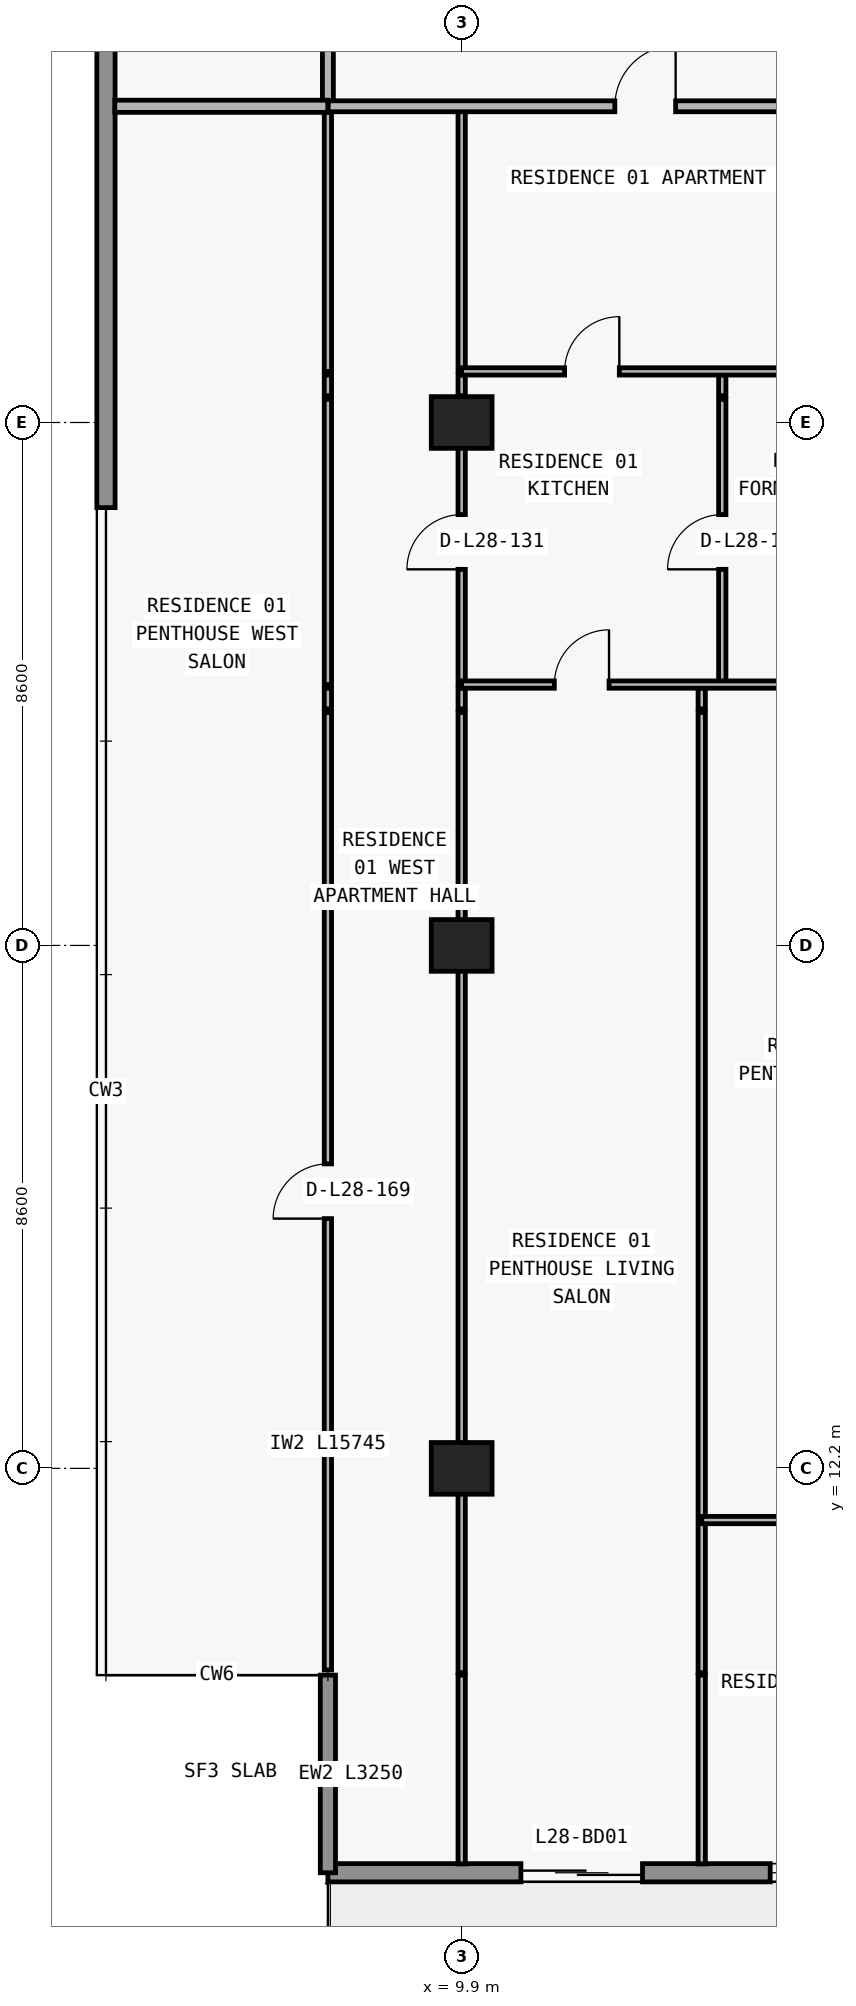
"""IFC4 building model, lengths in metres.
Left out: names, types, materials, properties, quantities, classifications, styles, units other than length and angle.
Written with IfcOpenShell. Run it as: python <this file> out.ifc"""

import sys

from ifc_helpers import new_model, si_unit, direction, frame, frame_2d, origin, origin_2d, place, context, subcontext, project, spatial, rectangle, extrude, element, fill, save


model = new_model("IFC4")
c1 = context("Model", 3, precision=1e-05, world=origin(), true_north=direction((0.0, 1.0)))
c2 = subcontext(c1, "Body", "Model", "MODEL_VIEW")
j1 = project(units=[si_unit("LENGTHUNIT", "METRE"), si_unit("PLANEANGLEUNIT", "RADIAN")], contexts=[c1])
p1 = place(None, origin())
s1 = spatial("IfcSite", under=j1, at=p1, CompositionType="ELEMENT")
p2 = place(p1, origin())
s2 = spatial("IfcBuilding", under=s1, at=p2, CompositionType="ELEMENT")
p3 = place(p2, frame((0.0, 0.0, 105.9)))
s3 = spatial("IfcBuildingStorey", under=s2, at=p3, CompositionType="ELEMENT", Elevation=105.9)
for number, where, z_axis, x_axis in (
    (1, (9.9, 12.2, 0.0), (0.0, 0.0, 1.0), (1.0, 0.0, 0.0)),
    (2, (9.9, 20.8, 0.0), (0.0, 0.0, 1.0), (1.0, 0.0, 0.0)),
    (3, (9.9, 29.4, 0.0), (0.0, 0.0, 1.0), (1.0, 0.0, 0.0)),
):
    element("IfcColumn", number, at=place(p3, frame(where, z_axis=z_axis, x_axis=x_axis)), inside=s3, PredefinedType="COLUMN", context=c2, shape_type="SweptSolid", body=[
        extrude(rectangle(XDim=1.0, YDim=0.85, at=origin_2d()), origin(), (0.0, 0.0, 1.0), 3.05),
    ])
p4 = place(p3, frame((70.1, 5.55, 0.0), z_axis=(0.0, 0.0, 1.0), x_axis=(-1.0, 0.0, 0.0)))
e4 = element("IfcWall", 4, at=p4, inside=s3, PredefinedType="STANDARD", context=c2, shape_type="SweptSolid", body=[
    extrude(rectangle(XDim=62.4, YDim=0.3, at=frame_2d((31.2, 0.0))), origin(), (0.0, 0.0, 1.0), 3.05),
])
p5 = place(p4, frame((57.226, 0.0, 0.0)))
e5 = element("IfcOpeningElement", 5, at=p5, cuts=e4, PredefinedType="OPENING", context=c2, shape_type="SweptSolid", body=[
    extrude(rectangle(XDim=2.0, YDim=2.3, at=frame_2d((1.0, 1.15))), frame((0.0, 0.16, 0.0), z_axis=(0.0, -1.0, 0.0), x_axis=(1.0, 0.0, 0.0)), (0.0, 0.0, 1.0), 0.32),
])
p6 = place(p4, frame((52.926, 0.0, 0.85)))
e6 = element("IfcOpeningElement", 6, at=p6, cuts=e4, PredefinedType="OPENING", context=c2, shape_type="SweptSolid", body=[
    extrude(rectangle(XDim=2.2, YDim=1.55, at=frame_2d((1.1, 0.775))), frame((0.0, 0.16, 0.0), z_axis=(0.0, -1.0, 0.0), x_axis=(1.0, 0.0, 0.0)), (0.0, 0.0, 1.0), 0.32),
])
p7 = place(p4, frame((48.49, 0.0, 0.0)))
e7 = element("IfcOpeningElement", 7, at=p7, cuts=e4, PredefinedType="OPENING", context=c2, shape_type="SweptSolid", body=[
    extrude(rectangle(XDim=2.0, YDim=2.3, at=frame_2d((1.0, 1.15))), frame((0.0, 0.16, 0.0), z_axis=(0.0, -1.0, 0.0), x_axis=(1.0, 0.0, 0.0)), (0.0, 0.0, 1.0), 0.32),
])
p8 = place(p4, frame((44.39, 0.0, 0.85)))
e8 = element("IfcOpeningElement", 8, at=p8, cuts=e4, PredefinedType="OPENING", context=c2, shape_type="SweptSolid", body=[
    extrude(rectangle(XDim=1.8, YDim=1.55, at=frame_2d((0.9, 0.775))), frame((0.0, 0.16, 0.0), z_axis=(0.0, -1.0, 0.0), x_axis=(1.0, 0.0, 0.0)), (0.0, 0.0, 1.0), 0.32),
])
p9 = place(p4, frame((40.49, 0.0, 0.0)))
e9 = element("IfcOpeningElement", 9, at=p9, cuts=e4, PredefinedType="OPENING", context=c2, shape_type="SweptSolid", body=[
    extrude(rectangle(XDim=2.0, YDim=2.3, at=frame_2d((1.0, 1.15))), frame((0.0, 0.16, 0.0), z_axis=(0.0, -1.0, 0.0), x_axis=(1.0, 0.0, 0.0)), (0.0, 0.0, 1.0), 0.32),
])
p10 = place(p4, frame((35.81, 0.0, 0.65)))
e10 = element("IfcOpeningElement", 10, at=p10, cuts=e4, PredefinedType="OPENING", context=c2, shape_type="SweptSolid", body=[
    extrude(rectangle(XDim=2.6, YDim=1.85, at=frame_2d((1.3, 0.925))), frame((0.0, 0.16, 0.0), z_axis=(0.0, -1.0, 0.0), x_axis=(1.0, 0.0, 0.0)), (0.0, 0.0, 1.0), 0.32),
])
p11 = place(p4, frame((30.1, 0.0, 0.85)))
e11 = element("IfcOpeningElement", 11, at=p11, cuts=e4, PredefinedType="OPENING", context=c2, shape_type="SweptSolid", body=[
    extrude(rectangle(XDim=2.2, YDim=1.55, at=frame_2d((1.1, 0.775))), frame((0.0, 0.16, 0.0), z_axis=(0.0, -1.0, 0.0), x_axis=(1.0, 0.0, 0.0)), (0.0, 0.0, 1.0), 0.32),
])
p12 = place(p4, frame((22.1, 0.0, 0.85)))
e12 = element("IfcOpeningElement", 12, at=p12, cuts=e4, PredefinedType="OPENING", context=c2, shape_type="SweptSolid", body=[
    extrude(rectangle(XDim=2.2, YDim=1.55, at=frame_2d((1.1, 0.775))), frame((0.0, 0.16, 0.0), z_axis=(0.0, -1.0, 0.0), x_axis=(1.0, 0.0, 0.0)), (0.0, 0.0, 1.0), 0.32),
])
p13 = place(p4, frame((15.69, 0.0, 0.0)))
e13 = element("IfcOpeningElement", 13, at=p13, cuts=e4, PredefinedType="OPENING", context=c2, shape_type="SweptSolid", body=[
    extrude(rectangle(XDim=2.0, YDim=2.3, at=frame_2d((1.0, 1.15))), frame((0.0, 0.16, 0.0), z_axis=(0.0, -1.0, 0.0), x_axis=(1.0, 0.0, 0.0)), (0.0, 0.0, 1.0), 0.32),
])
p14 = place(p4, frame((11.59, 0.0, 0.85)))
e14 = element("IfcOpeningElement", 14, at=p14, cuts=e4, PredefinedType="OPENING", context=c2, shape_type="SweptSolid", body=[
    extrude(rectangle(XDim=1.8, YDim=1.55, at=frame_2d((0.9, 0.775))), frame((0.0, 0.16, 0.0), z_axis=(0.0, -1.0, 0.0), x_axis=(1.0, 0.0, 0.0)), (0.0, 0.0, 1.0), 0.32),
])
p15 = place(p4, frame((7.626, 0.0, 0.0)))
e15 = element("IfcOpeningElement", 15, at=p15, cuts=e4, PredefinedType="OPENING", context=c2, shape_type="SweptSolid", body=[
    extrude(rectangle(XDim=2.0, YDim=2.3, at=frame_2d((1.0, 1.15))), frame((0.0, 0.16, 0.0), z_axis=(0.0, -1.0, 0.0), x_axis=(1.0, 0.0, 0.0)), (0.0, 0.0, 1.0), 0.32),
])
p16 = place(p4, frame((3.326, 0.0, 0.85)))
e16 = element("IfcOpeningElement", 16, at=p16, cuts=e4, PredefinedType="OPENING", context=c2, shape_type="SweptSolid", body=[
    extrude(rectangle(XDim=2.2, YDim=1.55, at=frame_2d((1.1, 0.775))), frame((0.0, 0.16, 0.0), z_axis=(0.0, -1.0, 0.0), x_axis=(1.0, 0.0, 0.0)), (0.0, 0.0, 1.0), 0.32),
])
p17 = place(p3, frame((7.7, 8.8, 0.0), z_axis=(0.0, 0.0, 1.0), x_axis=(0.0, -1.0, 0.0)))
e17 = element("IfcWall", 17, at=p17, inside=s3, PredefinedType="ELEMENTEDWALL", context=c2, shape_type="SweptSolid", body=[
    extrude(rectangle(XDim=3.25, YDim=0.25, at=frame_2d((1.625, 0.0))), origin(), (0.0, 0.0, 1.0), 3.05),
])
p18 = place(p3, frame((4.05, 28.0, 0.0), z_axis=(0.0, 0.0, 1.0), x_axis=(0.0, 1.0, 0.0)))
e18 = element("IfcWall", 18, at=p18, inside=s3, PredefinedType="STANDARD", context=c2, shape_type="SweptSolid", body=[
    extrude(rectangle(XDim=19.2, YDim=0.3, at=frame_2d((9.6, 0.0))), origin(), (0.0, 0.0, 1.0), 3.05),
])
p19 = place(p3, frame((7.7, 8.885, 0.0), z_axis=(0.0, 0.0, 1.0), x_axis=(0.0, 1.0, 0.0)))
e19 = element("IfcWall", 19, at=p19, inside=s3, PredefinedType="PARTITIONING", context=c2, shape_type="SweptSolid", body=[
    extrude(rectangle(XDim=15.745, YDim=0.12, at=frame_2d((7.873, 0.0))), origin(), (0.0, 0.0, 1.0), 3.05),
])
p20 = place(p19, frame((7.423, 0.0, 0.0)))
e20 = element("IfcOpeningElement", 20, at=p20, cuts=e19, PredefinedType="OPENING", context=c2, shape_type="SweptSolid", body=[
    extrude(rectangle(XDim=0.9, YDim=2.15, at=frame_2d((0.45, 1.075))), frame((0.0, 0.07, 0.0), z_axis=(0.0, -1.0, 0.0), x_axis=(1.0, 0.0, 0.0)), (0.0, 0.0, 1.0), 0.14),
])
p21 = place(p3, frame((7.7, 24.69, 0.0), z_axis=(0.0, 0.0, 1.0), x_axis=(0.0, 1.0, 0.0)))
e21 = element("IfcWall", 21, at=p21, inside=s3, PredefinedType="PARTITIONING", context=c2, shape_type="SweptSolid", body=[
    extrude(rectangle(XDim=0.34, YDim=0.12, at=frame_2d((0.17, 0.0))), origin(), (0.0, 0.0, 1.0), 3.05),
])
p22 = place(p3, frame((7.7, 25.09, 0.0), z_axis=(0.0, 0.0, 1.0), x_axis=(0.0, 1.0, 0.0)))
e22 = element("IfcWall", 22, at=p22, inside=s3, PredefinedType="PARTITIONING", context=c2, shape_type="SweptSolid", body=[
    extrude(rectangle(XDim=4.69, YDim=0.12, at=frame_2d((2.345, 0.0))), origin(), (0.0, 0.0, 1.0), 3.05),
])
p23 = place(p3, frame((7.7, 29.84, 0.0), z_axis=(0.0, 0.0, 1.0), x_axis=(0.0, 1.0, 0.0)))
e23 = element("IfcWall", 23, at=p23, inside=s3, PredefinedType="PARTITIONING", context=c2, shape_type="SweptSolid", body=[
    extrude(rectangle(XDim=0.34, YDim=0.12, at=frame_2d((0.17, 0.0))), origin(), (0.0, 0.0, 1.0), 3.05),
])
p24 = place(p3, frame((7.7, 30.24, 0.0), z_axis=(0.0, 0.0, 1.0), x_axis=(0.0, 1.0, 0.0)))
e24 = element("IfcWall", 24, at=p24, inside=s3, PredefinedType="PARTITIONING", context=c2, shape_type="SweptSolid", body=[
    extrude(rectangle(XDim=4.36, YDim=0.12, at=frame_2d((2.18, 0.0))), origin(), (0.0, 0.0, 1.0), 3.05),
])
p25 = place(p3, frame((7.7, 34.605, 0.0), z_axis=(0.0, 0.0, 1.0), x_axis=(0.0, 1.0, 0.0)))
e25 = element("IfcWall", 25, at=p25, inside=s3, PredefinedType="PARTITIONING", context=c2, shape_type="SweptSolid", body=[
    extrude(rectangle(XDim=2.345, YDim=0.18, at=frame_2d((1.172, 0.0))), origin(), (0.0, 0.0, 1.0), 3.05),
])
p26 = place(p3, frame((9.9, 5.695, 0.0), z_axis=(0.0, 0.0, 1.0), x_axis=(0.0, 1.0, 0.0)))
e26 = element("IfcWall", 26, at=p26, inside=s3, PredefinedType="PARTITIONING", context=c2, shape_type="SweptSolid", body=[
    extrude(rectangle(XDim=3.105, YDim=0.12, at=frame_2d((1.552, 0.0))), origin(), (0.0, 0.0, 1.0), 3.05),
])
p27 = place(p3, frame((9.9, 8.84, 0.0), z_axis=(0.0, 0.0, 1.0), x_axis=(0.0, 1.0, 0.0)))
e27 = element("IfcWall", 27, at=p27, inside=s3, PredefinedType="PARTITIONING", context=c2, shape_type="SweptSolid", body=[
    extrude(rectangle(XDim=15.79, YDim=0.12, at=frame_2d((7.895, 0.0))), origin(), (0.0, 0.0, 1.0), 2.174),
])
p28 = place(p3, frame((9.9, 24.69, 0.0), z_axis=(0.0, 0.0, 1.0), x_axis=(0.0, 1.0, 0.0)))
e28 = element("IfcWall", 28, at=p28, inside=s3, PredefinedType="PARTITIONING", context=c2, shape_type="SweptSolid", body=[
    extrude(rectangle(XDim=0.34, YDim=0.12, at=frame_2d((0.17, 0.0))), origin(), (0.0, 0.0, 1.0), 2.174),
])
p29 = place(p3, frame((9.9, 25.09, 0.0), z_axis=(0.0, 0.0, 1.0), x_axis=(0.0, 1.0, 0.0)))
e29 = element("IfcWall", 29, at=p29, inside=s3, PredefinedType="PARTITIONING", context=c2, shape_type="SweptSolid", body=[
    extrude(rectangle(XDim=4.69, YDim=0.12, at=frame_2d((2.345, 0.0))), origin(), (0.0, 0.0, 1.0), 2.174),
])
p30 = place(p29, frame((1.895, 0.0, 0.0)))
e30 = element("IfcOpeningElement", 30, at=p30, cuts=e29, PredefinedType="OPENING", context=c2, shape_type="SweptSolid", body=[
    extrude(rectangle(XDim=0.9, YDim=2.124, at=frame_2d((0.45, 1.062))), frame((0.0, 0.07, 0.0), z_axis=(0.0, -1.0, 0.0), x_axis=(1.0, 0.0, 0.0)), (0.0, 0.0, 1.0), 0.14),
])
p31 = place(p3, frame((9.9, 29.84, 0.0), z_axis=(0.0, 0.0, 1.0), x_axis=(0.0, 1.0, 0.0)))
e31 = element("IfcWall", 31, at=p31, inside=s3, PredefinedType="PARTITIONING", context=c2, shape_type="SweptSolid", body=[
    extrude(rectangle(XDim=0.34, YDim=0.12, at=frame_2d((0.17, 0.0))), origin(), (0.0, 0.0, 1.0), 2.174),
])
p32 = place(p3, frame((9.9, 30.24, 0.0), z_axis=(0.0, 0.0, 1.0), x_axis=(0.0, 1.0, 0.0)))
e32 = element("IfcWall", 32, at=p32, inside=s3, PredefinedType="PARTITIONING", context=c2, shape_type="SweptSolid", body=[
    extrude(rectangle(XDim=4.36, YDim=0.12, at=frame_2d((2.18, 0.0))), origin(), (0.0, 0.0, 1.0), 2.174),
])
p33 = place(p3, frame((13.848, 5.695, 0.0), z_axis=(0.0, 0.0, 1.0), x_axis=(0.0, 1.0, 0.0)))
e33 = element("IfcWall", 33, at=p33, inside=s3, PredefinedType="PARTITIONING", context=c2, shape_type="SweptSolid", body=[
    extrude(rectangle(XDim=3.105, YDim=0.12, at=frame_2d((1.552, 0.0))), origin(), (0.0, 0.0, 1.0), 3.05),
])
p34 = place(p3, frame((13.848, 8.84, 0.0), z_axis=(0.0, 0.0, 1.0), x_axis=(0.0, 1.0, 0.0)))
e34 = element("IfcWall", 34, at=p34, inside=s3, PredefinedType="PARTITIONING", context=c2, shape_type="SweptSolid", body=[
    extrude(rectangle(XDim=15.79, YDim=0.12, at=frame_2d((7.895, 0.0))), origin(), (0.0, 0.0, 1.0), 3.05),
])
p35 = place(p3, frame((13.848, 24.69, 0.0), z_axis=(0.0, 0.0, 1.0), x_axis=(0.0, 1.0, 0.0)))
e35 = element("IfcWall", 35, at=p35, inside=s3, PredefinedType="PARTITIONING", context=c2, shape_type="SweptSolid", body=[
    extrude(rectangle(XDim=0.34, YDim=0.12, at=frame_2d((0.17, 0.0))), origin(), (0.0, 0.0, 1.0), 3.05),
])
p36 = place(p3, frame((14.186, 25.09, 0.0), z_axis=(0.0, 0.0, 1.0), x_axis=(0.0, 1.0, 0.0)))
e36 = element("IfcWall", 36, at=p36, inside=s3, PredefinedType="PARTITIONING", context=c2, shape_type="SweptSolid", body=[
    extrude(rectangle(XDim=4.69, YDim=0.12, at=frame_2d((2.345, 0.0))), origin(), (0.0, 0.0, 1.0), 3.05),
])
p37 = place(p36, frame((1.895, 0.0, 0.0)))
e37 = element("IfcOpeningElement", 37, at=p37, cuts=e36, PredefinedType="OPENING", context=c2, shape_type="SweptSolid", body=[
    extrude(rectangle(XDim=0.9, YDim=2.15, at=frame_2d((0.45, 1.075))), frame((0.0, 0.07, 0.0), z_axis=(0.0, -1.0, 0.0), x_axis=(1.0, 0.0, 0.0)), (0.0, 0.0, 1.0), 0.14),
])
p38 = place(p3, frame((14.186, 29.84, 0.0), z_axis=(0.0, 0.0, 1.0), x_axis=(0.0, 1.0, 0.0)))
e38 = element("IfcWall", 38, at=p38, inside=s3, PredefinedType="PARTITIONING", context=c2, shape_type="SweptSolid", body=[
    extrude(rectangle(XDim=0.34, YDim=0.12, at=frame_2d((0.17, 0.0))), origin(), (0.0, 0.0, 1.0), 3.05),
])
p39 = place(p3, frame((13.848, 11.35, 0.0), z_axis=(0.0, 0.0, 1.0), x_axis=(1.0, 0.0, 0.0)))
e39 = element("IfcWall", 39, at=p39, inside=s3, PredefinedType="PARTITIONING", context=c2, shape_type="SweptSolid", body=[
    extrude(rectangle(XDim=4.402, YDim=0.12, at=frame_2d((2.201, 0.0))), origin(), (0.0, 0.0, 1.0), 3.05),
])
p40 = place(p39, frame((1.751, 0.0, 0.0)))
e40 = element("IfcOpeningElement", 40, at=p40, cuts=e39, PredefinedType="OPENING", context=c2, shape_type="SweptSolid", body=[
    extrude(rectangle(XDim=0.9, YDim=2.15, at=frame_2d((0.45, 1.075))), frame((0.0, 0.07, 0.0), z_axis=(0.0, -1.0, 0.0), x_axis=(1.0, 0.0, 0.0)), (0.0, 0.0, 1.0), 0.14),
])
p41 = place(p3, frame((9.9, 25.09, 0.0), z_axis=(0.0, 0.0, 1.0), x_axis=(1.0, 0.0, 0.0)))
e41 = element("IfcWall", 41, at=p41, inside=s3, PredefinedType="PARTITIONING", context=c2, shape_type="SweptSolid", body=[
    extrude(rectangle(XDim=8.35, YDim=0.12, at=frame_2d((4.175, 0.0))), origin(), (0.0, 0.0, 1.0), 3.05),
])
p42 = place(p41, frame((1.524, 0.0, 0.0)))
e42 = element("IfcOpeningElement", 42, at=p42, cuts=e41, PredefinedType="OPENING", context=c2, shape_type="SweptSolid", body=[
    extrude(rectangle(XDim=0.9, YDim=2.15, at=frame_2d((0.45, 1.075))), frame((0.0, 0.07, 0.0), z_axis=(0.0, -1.0, 0.0), x_axis=(1.0, 0.0, 0.0)), (0.0, 0.0, 1.0), 0.14),
])
p43 = place(p41, frame((5.868, 0.0, 0.0)))
e43 = element("IfcOpeningElement", 43, at=p43, cuts=e41, PredefinedType="OPENING", context=c2, shape_type="SweptSolid", body=[
    extrude(rectangle(XDim=0.9, YDim=2.15, at=frame_2d((0.45, 1.075))), frame((0.0, 0.07, 0.0), z_axis=(0.0, -1.0, 0.0), x_axis=(1.0, 0.0, 0.0)), (0.0, 0.0, 1.0), 0.14),
])
p44 = place(p3, frame((9.9, 30.24, 0.0), z_axis=(0.0, 0.0, 1.0), x_axis=(1.0, 0.0, 0.0)))
e44 = element("IfcWall", 44, at=p44, inside=s3, PredefinedType="PARTITIONING", context=c2, shape_type="SweptSolid", body=[
    extrude(rectangle(XDim=8.35, YDim=0.12, at=frame_2d((4.175, 0.0))), origin(), (0.0, 0.0, 1.0), 3.05),
])
p45 = place(p44, frame((1.693, 0.0, 0.0)))
e45 = element("IfcOpeningElement", 45, at=p45, cuts=e44, PredefinedType="OPENING", context=c2, shape_type="SweptSolid", body=[
    extrude(rectangle(XDim=0.9, YDim=2.15, at=frame_2d((0.45, 1.075))), frame((0.0, 0.07, 0.0), z_axis=(0.0, -1.0, 0.0), x_axis=(1.0, 0.0, 0.0)), (0.0, 0.0, 1.0), 0.14),
])
p46 = place(p3, frame((4.195, 34.6, 0.0), z_axis=(0.0, 0.0, 1.0), x_axis=(1.0, 0.0, 0.0)))
e46 = element("IfcWall", 46, at=p46, inside=s3, PredefinedType="PARTITIONING", context=c2, shape_type="SweptSolid", body=[
    extrude(rectangle(XDim=3.505, YDim=0.2, at=frame_2d((1.752, 0.0))), origin(), (0.0, 0.0, 1.0), 3.05),
])
p47 = place(p3, frame((7.705, 34.6, 0.0), z_axis=(0.0, 0.0, 1.0), x_axis=(1.0, 0.0, 0.0)))
e47 = element("IfcWall", 47, at=p47, inside=s3, PredefinedType="PARTITIONING", context=c2, shape_type="SweptSolid", body=[
    extrude(rectangle(XDim=10.545, YDim=0.18, at=frame_2d((5.272, 0.0))), origin(), (0.0, 0.0, 1.0), 3.05),
])
p48 = place(p47, frame((4.714, 0.0, 0.0)))
e48 = element("IfcOpeningElement", 48, at=p48, cuts=e47, PredefinedType="OPENING", context=c2, shape_type="SweptSolid", body=[
    extrude(rectangle(XDim=1.0, YDim=2.2, at=frame_2d((0.5, 1.1))), frame((0.0, 0.1, 0.0), z_axis=(0.0, -1.0, 0.0), x_axis=(1.0, 0.0, 0.0)), (0.0, 0.0, 1.0), 0.2),
])
p49 = place(p5, origin())
e49 = element("IfcDoor", 49, at=p49, inside=s3, OperationType="DOUBLE_DOOR_SLIDING", PredefinedType="DOOR", context=c2, shape_type="SweptSolid", body=[
    extrude(rectangle(XDim=2.0, YDim=2.3, at=frame_2d((1.0, 1.15))), frame((0.0, 0.025, 0.0), z_axis=(0.0, -1.0, 0.0), x_axis=(1.0, 0.0, 0.0)), (0.0, 0.0, 1.0), 0.05),
])
fill(e5, e49)
p50 = place(p6, origin())
e50 = element("IfcWindow", 50, at=p50, inside=s3, PartitioningType="SINGLE_PANEL", PredefinedType="WINDOW", context=c2, shape_type="SweptSolid", body=[
    extrude(rectangle(XDim=2.2, YDim=1.55, at=frame_2d((1.1, 0.775))), frame((0.0, 0.03, 0.0), z_axis=(0.0, -1.0, 0.0), x_axis=(1.0, 0.0, 0.0)), (0.0, 0.0, 1.0), 0.06),
])
fill(e6, e50)
p51 = place(p48, origin())
e51 = element("IfcDoor", 51, at=p51, inside=s3, OperationType="SINGLE_SWING_RIGHT", PredefinedType="DOOR", context=c2, shape_type="SweptSolid", body=[
    extrude(rectangle(XDim=1.0, YDim=2.2, at=frame_2d((0.5, 1.1))), frame((0.0, 0.025, 0.0), z_axis=(0.0, -1.0, 0.0), x_axis=(1.0, 0.0, 0.0)), (0.0, 0.0, 1.0), 0.05),
])
fill(e48, e51)
p52 = place(p45, origin())
e52 = element("IfcDoor", 52, at=p52, inside=s3, OperationType="SINGLE_SWING_RIGHT", PredefinedType="DOOR", context=c2, shape_type="SweptSolid", body=[
    extrude(rectangle(XDim=0.9, YDim=2.15, at=frame_2d((0.45, 1.075))), frame((0.0, 0.025, 0.0), z_axis=(0.0, -1.0, 0.0), x_axis=(1.0, 0.0, 0.0)), (0.0, 0.0, 1.0), 0.05),
])
fill(e45, e52)
p53 = place(p37, origin())
e53 = element("IfcDoor", 53, at=p53, inside=s3, OperationType="SINGLE_SWING_LEFT", PredefinedType="DOOR", context=c2, shape_type="SweptSolid", body=[
    extrude(rectangle(XDim=0.9, YDim=2.15, at=frame_2d((0.45, 1.075))), frame((0.0, 0.025, 0.0), z_axis=(0.0, -1.0, 0.0), x_axis=(1.0, 0.0, 0.0)), (0.0, 0.0, 1.0), 0.05),
])
fill(e37, e53)
p54 = place(p42, origin())
e54 = element("IfcDoor", 54, at=p54, inside=s3, OperationType="SINGLE_SWING_RIGHT", PredefinedType="DOOR", context=c2, shape_type="SweptSolid", body=[
    extrude(rectangle(XDim=0.9, YDim=2.15, at=frame_2d((0.45, 1.075))), frame((0.0, 0.025, 0.0), z_axis=(0.0, -1.0, 0.0), x_axis=(1.0, 0.0, 0.0)), (0.0, 0.0, 1.0), 0.05),
])
fill(e42, e54)
p55 = place(p30, origin())
e55 = element("IfcDoor", 55, at=p55, inside=s3, OperationType="SINGLE_SWING_LEFT", PredefinedType="DOOR", context=c2, shape_type="SweptSolid", body=[
    extrude(rectangle(XDim=0.9, YDim=2.124, at=frame_2d((0.45, 1.062))), frame((0.0, 0.025, 0.0), z_axis=(0.0, -1.0, 0.0), x_axis=(1.0, 0.0, 0.0)), (0.0, 0.0, 1.0), 0.05),
])
fill(e30, e55)
p56 = place(p20, origin())
e56 = element("IfcDoor", 56, at=p56, inside=s3, OperationType="SINGLE_SWING_LEFT", PredefinedType="DOOR", context=c2, shape_type="SweptSolid", body=[
    extrude(rectangle(XDim=0.9, YDim=2.15, at=frame_2d((0.45, 1.075))), frame((0.0, 0.025, 0.0), z_axis=(0.0, -1.0, 0.0), x_axis=(1.0, 0.0, 0.0)), (0.0, 0.0, 1.0), 0.05),
])
fill(e20, e56)
save(model, sys.argv[1])
